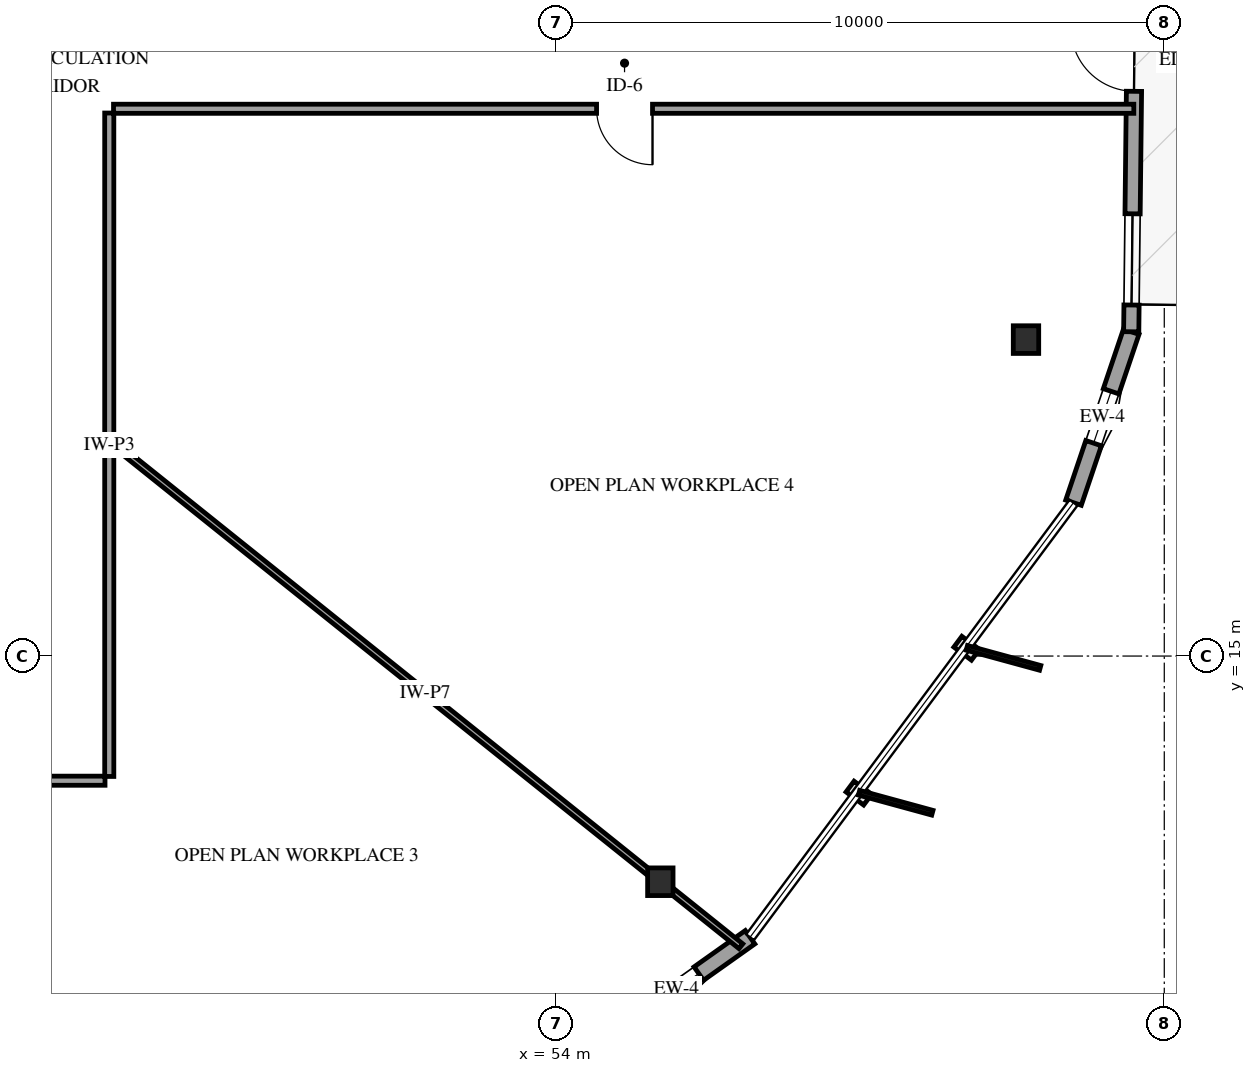
"""IFC4 building model, lengths in metres.
Left out: names, types, materials, properties, quantities, classifications, styles, units other than length and angle.
Written with IfcOpenShell. Run it as: python <this file> out.ifc"""

import sys

from ifc_helpers import new_model, si_unit, direction, frame, frame_2d, origin, origin_2d, place, context, subcontext, project, spatial, rectangle, i_section, extrude, element, fill, save


model = new_model("IFC4")
c1 = context("Model", 3, precision=1e-05, world=origin(), true_north=direction((0.0, 1.0)))
c2 = subcontext(c1, "Body", "Model", "MODEL_VIEW")
j1 = project(units=[si_unit("LENGTHUNIT", "METRE"), si_unit("PLANEANGLEUNIT", "RADIAN")], contexts=[c1])
p1 = place(None, origin())
s1 = spatial("IfcSite", under=j1, at=p1, CompositionType="ELEMENT")
p2 = place(p1, origin())
s2 = spatial("IfcBuilding", under=s1, at=p2, CompositionType="ELEMENT")
p3 = place(p2, frame((0.0, 0.0, 95.2)))
s3 = spatial("IfcBuildingStorey", under=s2, at=p3, CompositionType="ELEMENT", Elevation=95.2)
for number, where, z_axis, x_axis in (
    (1, (55.712, 11.289, 0.0), (0.0, 0.0, 1.0), (1.0, 0.0, 0.0)),
    (2, (61.726, 20.204, 0.0), (0.0, 0.0, 1.0), (1.0, 0.0, 0.0)),
):
    element("IfcColumn", number, at=place(p3, frame(where, z_axis=z_axis, x_axis=x_axis)), inside=s3, PredefinedType="COLUMN", context=c2, shape_type="SweptSolid", body=[
        extrude(i_section(OverallWidth=0.418, OverallDepth=0.455, WebThickness=0.042, FlangeThickness=0.068, FilletRadius=0.038, at=origin_2d()), origin(), (0.0, 0.0, 1.0), 3.9),
    ])
p4 = place(p3, frame((54.768, 8.66, 0.0), z_axis=(0.0, 0.0, 1.0), x_axis=(0.815686288548, 0.57849449321, 0.0)))
e3 = element("IfcWall", 3, at=p4, inside=s3, PredefinedType="SOLIDWALL", context=c2, shape_type="SweptSolid", body=[
    extrude(rectangle(XDim=2.967, YDim=0.27, at=frame_2d((1.483, 0.0))), origin(), (0.0, 0.0, 1.0), 2.979),
])
p5 = place(p4, frame((1.033, 0.0, 0.75)))
e4 = element("IfcOpeningElement", 4, at=p5, cuts=e3, PredefinedType="OPENING", context=c2, shape_type="SweptSolid", body=[
    extrude(rectangle(XDim=0.9, YDim=1.5, at=frame_2d((0.45, 0.75))), frame((0.0, 0.145, 0.0), z_axis=(0.0, -1.0, 0.0), x_axis=(1.0, 0.0, 0.0)), (0.0, 0.0, 1.0), 0.29),
])
p6 = place(p3, frame((62.507, 17.522, 0.0), z_axis=(0.0, 0.0, 1.0), x_axis=(0.319978121569, 0.94742493197, 0.0)))
e5 = element("IfcWall", 5, at=p6, inside=s3, PredefinedType="SOLIDWALL", context=c2, shape_type="SweptSolid", body=[
    extrude(rectangle(XDim=2.967, YDim=0.27, at=frame_2d((1.483, 0.0))), origin(), (0.0, 0.0, 1.0), 2.979),
])
p7 = place(p6, frame((1.033, 0.0, 0.75)))
e6 = element("IfcOpeningElement", 6, at=p7, cuts=e5, PredefinedType="OPENING", context=c2, shape_type="SweptSolid", body=[
    extrude(rectangle(XDim=0.9, YDim=1.5, at=frame_2d((0.45, 0.75))), frame((0.0, 0.145, 0.0), z_axis=(0.0, -1.0, 0.0), x_axis=(1.0, 0.0, 0.0)), (0.0, 0.0, 1.0), 0.29),
])
p8 = place(p3, frame((63.456, 20.333, 0.0), z_axis=(0.0, 0.0, 1.0), x_axis=(0.011510186569, 0.999933755608, 0.0)))
e7 = element("IfcWall", 7, at=p8, inside=s3, PredefinedType="SOLIDWALL", context=c2, shape_type="SweptSolid", body=[
    extrude(rectangle(XDim=8.908, YDim=0.25, at=frame_2d((4.454, 0.0))), origin(), (0.0, 0.0, 1.0), 2.979),
])
p9 = place(p8, frame((3.954, 0.0, 0.0)))
e8 = element("IfcOpeningElement", 8, at=p9, cuts=e7, PredefinedType="OPENING", context=c2, shape_type="SweptSolid", body=[
    extrude(rectangle(XDim=1.05, YDim=2.15, at=frame_2d((0.525, 1.075))), frame((0.0, 0.135, 0.0), z_axis=(0.0, -1.0, 0.0), x_axis=(1.0, 0.0, 0.0)), (0.0, 0.0, 1.0), 0.27),
])
p10 = place(p8, frame((0.44, 0.0, 0.72)))
e9 = element("IfcOpeningElement", 9, at=p10, cuts=e7, PredefinedType="OPENING", context=c2, shape_type="SweptSolid", body=[
    extrude(rectangle(XDim=1.5, YDim=1.7, at=frame_2d((0.75, 0.85))), frame((0.0, 0.135, 0.0), z_axis=(0.0, -1.0, 0.0), x_axis=(1.0, 0.0, 0.0)), (0.0, 0.0, 1.0), 0.27),
])
p11 = place(p8, frame((5.975, 0.0, 0.72)))
e10 = element("IfcOpeningElement", 10, at=p11, cuts=e7, PredefinedType="OPENING", context=c2, shape_type="SweptSolid", body=[
    extrude(rectangle(XDim=1.5, YDim=1.7, at=frame_2d((0.75, 0.85))), frame((0.0, 0.135, 0.0), z_axis=(0.0, -1.0, 0.0), x_axis=(1.0, 0.0, 0.0)), (0.0, 0.0, 1.0), 0.27),
])
p12 = place(p3, frame((63.499, 24.0, 0.0), z_axis=(0.0, 0.0, 1.0), x_axis=(-1.0, 0.0, 0.0)))
e11 = element("IfcWall", 11, at=p12, inside=s3, PredefinedType="PARTITIONING", context=c2, shape_type="SweptSolid", body=[
    extrude(rectangle(XDim=16.779, YDim=0.15, at=frame_2d((8.39, 0.0))), origin(), (0.0, 0.0, 1.0), 3.6),
])
p13 = place(p12, frame((7.915, 0.0, 0.0)))
e12 = element("IfcOpeningElement", 12, at=p13, cuts=e11, PredefinedType="OPENING", context=c2, shape_type="SweptSolid", body=[
    extrude(rectangle(XDim=0.92, YDim=2.12, at=frame_2d((0.46, 1.06))), frame((0.0, 0.085, 0.0), z_axis=(0.0, -1.0, 0.0), x_axis=(1.0, 0.0, 0.0)), (0.0, 0.0, 1.0), 0.17),
])
p14 = place(p3, frame((46.65, 18.55, 0.0), z_axis=(0.0, 0.0, 1.0), x_axis=(0.780419428842, -0.625256359492, 0.0)))
e13 = element("IfcWall", 13, at=p14, inside=s3, PredefinedType="PARTITIONING", context=c2, shape_type="SweptSolid", body=[
    extrude(rectangle(XDim=13.31, YDim=0.1, at=frame_2d((6.655, 0.0))), origin(), (0.0, 0.0, 1.0), 2.978),
])
p15 = place(p3, frame((46.58, 12.95, 0.0), z_axis=(0.0, 0.0, 1.0), x_axis=(-1.0, 0.0, 0.0)))
e14 = element("IfcWall", 14, at=p15, inside=s3, PredefinedType="PARTITIONING", context=c2, shape_type="SweptSolid", body=[
    extrude(rectangle(XDim=10.761, YDim=0.15, at=frame_2d((5.38, 0.0))), origin(), (0.0, 0.0, 1.0), 3.6),
])
p16 = place(p15, frame((4.905, 0.0, 0.0)))
e15 = element("IfcOpeningElement", 15, at=p16, cuts=e14, PredefinedType="OPENING", context=c2, shape_type="SweptSolid", body=[
    extrude(rectangle(XDim=0.92, YDim=2.12, at=frame_2d((0.46, 1.06))), frame((0.0, 0.085, 0.0), z_axis=(0.0, -1.0, 0.0), x_axis=(1.0, 0.0, 0.0)), (0.0, 0.0, 1.0), 0.17),
])
p17 = place(p3, frame((46.65, 18.55, 0.0), z_axis=(0.0, 0.0, 1.0), x_axis=(0.0, -1.0, 0.0)))
e16 = element("IfcWall", 16, at=p17, inside=s3, PredefinedType="PARTITIONING", context=c2, shape_type="SweptSolid", body=[
    extrude(rectangle(XDim=5.53, YDim=0.15, at=frame_2d((2.765, 0.0))), origin(), (0.0, 0.0, 1.0), 3.6),
])
p18 = place(p3, frame((46.65, 23.93, 0.0), z_axis=(0.0, 0.0, 1.0), x_axis=(0.0, -1.0, 0.0)))
e17 = element("IfcWall", 17, at=p18, inside=s3, PredefinedType="PARTITIONING", context=c2, shape_type="SweptSolid", body=[
    extrude(rectangle(XDim=5.38, YDim=0.15, at=frame_2d((2.69, 0.0))), origin(), (0.0, 0.0, 1.0), 3.6),
])
p19 = place(p5, origin())
e18 = element("IfcWindow", 18, at=p19, inside=s3, PartitioningType="SINGLE_PANEL", PredefinedType="WINDOW", context=c2, shape_type="SweptSolid", body=[
    extrude(rectangle(XDim=0.9, YDim=1.5, at=frame_2d((0.45, 0.75))), frame((0.0, 0.03, 0.0), z_axis=(0.0, -1.0, 0.0), x_axis=(1.0, 0.0, 0.0)), (0.0, 0.0, 1.0), 0.06),
])
fill(e4, e18)
p20 = place(p7, origin())
e19 = element("IfcWindow", 19, at=p20, inside=s3, PartitioningType="SINGLE_PANEL", PredefinedType="WINDOW", context=c2, shape_type="SweptSolid", body=[
    extrude(rectangle(XDim=0.9, YDim=1.5, at=frame_2d((0.45, 0.75))), frame((0.0, 0.03, 0.0), z_axis=(0.0, -1.0, 0.0), x_axis=(1.0, 0.0, 0.0)), (0.0, 0.0, 1.0), 0.06),
])
fill(e6, e19)
p21 = place(p9, origin())
e20 = element("IfcDoor", 20, at=p21, inside=s3, OperationType="SINGLE_SWING_RIGHT", PredefinedType="DOOR", context=c2, shape_type="SweptSolid", body=[
    extrude(rectangle(XDim=1.05, YDim=2.15, at=frame_2d((0.525, 1.075))), frame((0.0, 0.025, 0.0), z_axis=(0.0, -1.0, 0.0), x_axis=(1.0, 0.0, 0.0)), (0.0, 0.0, 1.0), 0.05),
])
fill(e8, e20)
p22 = place(p10, origin())
e21 = element("IfcWindow", 21, at=p22, inside=s3, PartitioningType="SINGLE_PANEL", PredefinedType="WINDOW", context=c2, shape_type="SweptSolid", body=[
    extrude(rectangle(XDim=1.5, YDim=1.7, at=frame_2d((0.75, 0.85))), frame((0.0, 0.03, 0.0), z_axis=(0.0, -1.0, 0.0), x_axis=(1.0, 0.0, 0.0)), (0.0, 0.0, 1.0), 0.06),
])
fill(e9, e21)
p23 = place(p13, origin())
e22 = element("IfcDoor", 22, at=p23, inside=s3, OperationType="SINGLE_SWING_LEFT", PredefinedType="DOOR", context=c2, shape_type="SweptSolid", body=[
    extrude(rectangle(XDim=0.92, YDim=2.12, at=frame_2d((0.46, 1.06))), frame((0.0, 0.025, 0.0), z_axis=(0.0, -1.0, 0.0), x_axis=(1.0, 0.0, 0.0)), (0.0, 0.0, 1.0), 0.05),
])
fill(e12, e22)
save(model, sys.argv[1])
